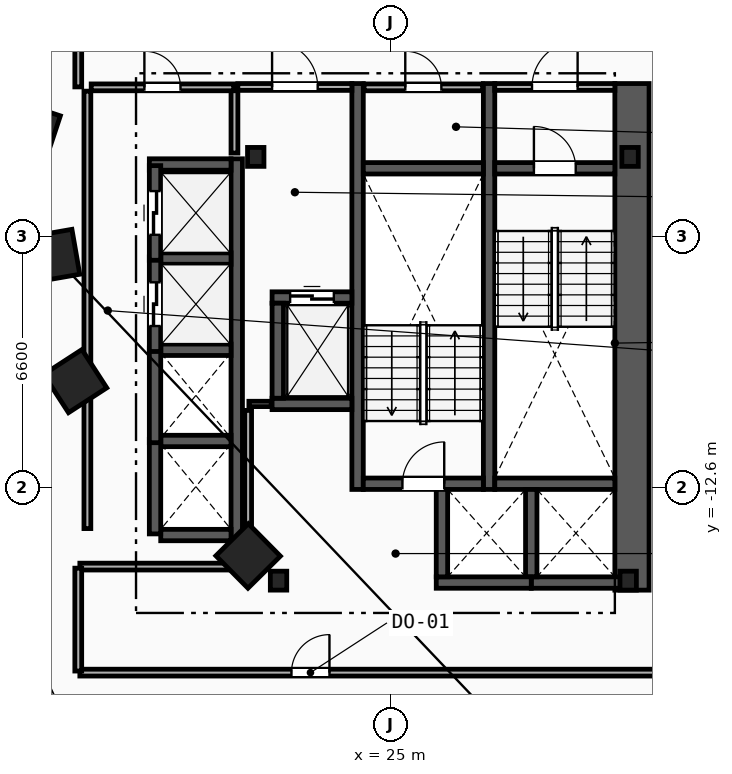
"""IFC4 building model, lengths in metres.
Left out: names, types, materials, properties, quantities, classifications, styles, units other than length and angle.
Written with IfcOpenShell. Run it as: python <this file> out.ifc"""

import sys

from ifc_helpers import new_model, si_unit, direction, frame, frame_2d, origin, origin_2d, place, context, subcontext, project, spatial, rectangle, i_section, extrude, element, fill, save


model = new_model("IFC4")
c1 = context("Model", 3, precision=1e-05, world=origin(), true_north=direction((0.0, 1.0)))
c2 = subcontext(c1, "Body", "Model", "MODEL_VIEW")
j1 = project(units=[si_unit("LENGTHUNIT", "METRE"), si_unit("PLANEANGLEUNIT", "RADIAN")], contexts=[c1])
p1 = place(None, origin())
s1 = spatial("IfcSite", under=j1, at=p1, CompositionType="ELEMENT")
p2 = place(p1, origin())
s2 = spatial("IfcBuilding", under=s1, at=p2, CompositionType="ELEMENT")
p3 = place(p2, frame((0.0, 0.0, 54.4)))
s3 = spatial("IfcBuildingStorey", under=s2, at=p3, CompositionType="ELEMENT", Elevation=54.4)
for number, where, z_axis, x_axis in (
    (1, (31.3, -3.9, 0.0), (0.0, 0.0, 1.0), (1.0, 0.0, 0.0)),
    (2, (21.45, -3.9, 0.0), (0.0, 0.0, 1.0), (1.0, 0.0, 0.0)),
    (3, (22.05, -15.05, 0.0), (0.0, 0.0, 1.0), (1.0, 0.0, 0.0)),
    (4, (31.25, -15.05, 0.0), (0.0, 0.0, 1.0), (1.0, 0.0, 0.0)),
):
    element("IfcColumn", number, at=place(p3, frame(where, z_axis=z_axis, x_axis=x_axis)), inside=s3, PredefinedType="COLUMN", context=c2, shape_type="SweptSolid", body=[
        extrude(i_section(OverallWidth=0.432, OverallDepth=0.498, WebThickness=0.056, FlangeThickness=0.089, FilletRadius=0.018, at=origin_2d()), origin(), (0.0, 0.0, 1.0), 3.8),
    ])
for number, where, z_axis, x_axis in (
    (5, (15.55, -3.2, 0.0), (0.0, 0.0, 1.0), (-0.315, -0.949, 0.0)),
    (6, (16.125, -6.5, 0.0), (0.0, 0.0, 1.0), (0.172, -0.985, 0.0)),
    (7, (16.7, -9.8, 0.0), (0.0, 0.0, 1.0), (0.544, -0.839, 0.0)),
    (8, (21.25, -14.4, 0.0), (0.0, 0.0, 1.0), (0.703, -0.711, 0.0)),
):
    element("IfcColumn", number, at=place(p3, frame(where, z_axis=z_axis, x_axis=x_axis)), inside=s3, PredefinedType="COLUMN", context=c2, shape_type="SweptSolid", body=[
        extrude(rectangle(XDim=1.2, YDim=1.2, at=origin_2d()), origin(), (0.0, 0.0, 1.0), 3.8),
    ])
p4 = place(p3, frame((31.35, -15.3, 0.0), z_axis=(0.0, 0.0, 1.0), x_axis=(0.0, 1.0, 0.0)))
e9 = element("IfcWall", 9, at=p4, inside=s3, PredefinedType="SHEAR", context=c2, shape_type="SweptSolid", body=[
    extrude(rectangle(XDim=13.33, YDim=0.9, at=frame_2d((6.665, 0.0))), origin(), (0.0, 0.0, 1.0), 3.5),
])
for number, where, z_axis, x_axis in (
    (10, (27.59, -12.65, 0.0), (0.0, 0.0, 1.0), (0.0, 1.0, 0.0)),
    (11, (24.13, -12.65, 0.0), (0.0, 0.0, 1.0), (0.0, 1.0, 0.0)),
):
    element("IfcWall", number, at=place(p3, frame(where, z_axis=z_axis, x_axis=x_axis)), inside=s3, PredefinedType="SHEAR", context=c2, shape_type="SweptSolid", body=[
        extrude(rectangle(XDim=10.68, YDim=0.3, at=frame_2d((5.34, 0.0))), origin(), (0.0, 0.0, 1.0), 3.5),
    ])
p5 = place(p3, frame((27.74, -4.2, 0.0), z_axis=(0.0, 0.0, 1.0), x_axis=(1.0, 0.0, 0.0)))
e12 = element("IfcWall", 12, at=p5, inside=s3, PredefinedType="SHEAR", context=c2, shape_type="SweptSolid", body=[
    extrude(rectangle(XDim=3.16, YDim=0.3, at=frame_2d((1.58, 0.0))), origin(), (0.0, 0.0, 1.0), 3.5),
])
p6 = place(p5, frame((1.03, 0.0, 0.0)))
e13 = element("IfcOpeningElement", 13, at=p6, cuts=e12, PredefinedType="OPENING", context=c2, shape_type="SweptSolid", body=[
    extrude(rectangle(XDim=1.1, YDim=2.15, at=frame_2d((0.55, 1.075))), frame((0.0, 0.16, 0.0), z_axis=(0.0, -1.0, 0.0), x_axis=(1.0, 0.0, 0.0)), (0.0, 0.0, 1.0), 0.32),
])
p7 = place(p3, frame((27.74, -12.5, 0.0), z_axis=(0.0, 0.0, 1.0), x_axis=(1.0, 0.0, 0.0)))
e14 = element("IfcWall", 14, at=p7, inside=s3, PredefinedType="SHEAR", context=c2, shape_type="SweptSolid", body=[
    extrude(rectangle(XDim=3.16, YDim=0.3, at=frame_2d((1.58, 0.0))), origin(), (0.0, 0.0, 1.0), 3.5),
])
p8 = place(p3, frame((24.28, -12.5, 0.0), z_axis=(0.0, 0.0, 1.0), x_axis=(1.0, 0.0, 0.0)))
e15 = element("IfcWall", 15, at=p8, inside=s3, PredefinedType="SHEAR", context=c2, shape_type="SweptSolid", body=[
    extrude(rectangle(XDim=3.16, YDim=0.3, at=frame_2d((1.58, 0.0))), origin(), (0.0, 0.0, 1.0), 3.5),
])
p9 = place(p8, frame((1.03, 0.0, 0.0)))
e16 = element("IfcOpeningElement", 16, at=p9, cuts=e15, PredefinedType="OPENING", context=c2, shape_type="SweptSolid", body=[
    extrude(rectangle(XDim=1.1, YDim=2.15, at=frame_2d((0.55, 1.075))), frame((0.0, 0.16, 0.0), z_axis=(0.0, -1.0, 0.0), x_axis=(1.0, 0.0, 0.0)), (0.0, 0.0, 1.0), 0.32),
])
p10 = place(p3, frame((24.28, -4.2, 0.0), z_axis=(0.0, 0.0, 1.0), x_axis=(1.0, 0.0, 0.0)))
e17 = element("IfcWall", 17, at=p10, inside=s3, PredefinedType="SHEAR", context=c2, shape_type="SweptSolid", body=[
    extrude(rectangle(XDim=3.16, YDim=0.3, at=frame_2d((1.58, 0.0))), origin(), (0.0, 0.0, 1.0), 3.5),
])
p11 = place(p3, frame((20.89, -3.8, 0.0), z_axis=(0.0, 0.0, 1.0), x_axis=(0.0, 1.0, 0.0)))
e18 = element("IfcWall", 18, at=p11, inside=s3, PredefinedType="PARTITIONING", context=c2, shape_type="SweptSolid", body=[
    extrude(rectangle(XDim=1.65, YDim=0.18, at=frame_2d((0.825, 0.0))), origin(), (0.0, 0.0, 1.0), 3.5),
])
p12 = place(p3, frame((20.98, -2.06, 0.0), z_axis=(0.0, 0.0, 1.0), x_axis=(1.0, 0.0, 0.0)))
e19 = element("IfcWall", 19, at=p12, inside=s3, PredefinedType="PARTITIONING", context=c2, shape_type="SweptSolid", body=[
    extrude(rectangle(XDim=3.0, YDim=0.18, at=frame_2d((1.5, 0.0))), origin(), (0.0, 0.0, 1.0), 3.5),
])
p13 = place(p12, frame((0.9, 0.0, 0.0)))
e20 = element("IfcOpeningElement", 20, at=p13, cuts=e19, PredefinedType="OPENING", context=c2, shape_type="SweptSolid", body=[
    extrude(rectangle(XDim=1.2, YDim=2.15, at=frame_2d((0.6, 1.075))), frame((0.0, 0.1, 0.0), z_axis=(0.0, -1.0, 0.0), x_axis=(1.0, 0.0, 0.0)), (0.0, 0.0, 1.0), 0.2),
])
p14 = place(p3, frame((27.74, -2.06, 0.0), z_axis=(0.0, 0.0, 1.0), x_axis=(1.0, 0.0, 0.0)))
e21 = element("IfcWall", 21, at=p14, inside=s3, PredefinedType="PARTITIONING", context=c2, shape_type="SweptSolid", body=[
    extrude(rectangle(XDim=3.16, YDim=0.18, at=frame_2d((1.58, 0.0))), origin(), (0.0, 0.0, 1.0), 3.5),
])
p15 = place(p14, frame((0.98, 0.0, 0.0)))
e22 = element("IfcOpeningElement", 22, at=p15, cuts=e21, PredefinedType="OPENING", context=c2, shape_type="SweptSolid", body=[
    extrude(rectangle(XDim=1.2, YDim=2.15, at=frame_2d((0.6, 1.075))), frame((0.0, 0.1, 0.0), z_axis=(0.0, -1.0, 0.0), x_axis=(1.0, 0.0, 0.0)), (0.0, 0.0, 1.0), 0.2),
])
p16 = place(p3, frame((21.88, -7.6, 0.0), z_axis=(0.0, 0.0, 1.0), x_axis=(1.0, 0.0, 0.0)))
e23 = element("IfcWall", 23, at=p16, inside=s3, PredefinedType="SHEAR", context=c2, shape_type="SweptSolid", body=[
    extrude(rectangle(XDim=2.1, YDim=0.3, at=frame_2d((1.05, 0.0))), origin(), (0.0, 0.0, 1.0), 3.5),
])
p17 = place(p16, frame((0.475, 0.0, 0.0)))
e24 = element("IfcOpeningElement", 24, at=p17, cuts=e23, PredefinedType="OPENING", context=c2, shape_type="SweptSolid", body=[
    extrude(rectangle(XDim=1.15, YDim=2.2, at=frame_2d((0.575, 1.1))), frame((0.0, 0.16, 0.0), z_axis=(0.0, -1.0, 0.0), x_axis=(1.0, 0.0, 0.0)), (0.0, 0.0, 1.0), 0.32),
])
p18 = place(p3, frame((21.88, -10.4, 0.0), z_axis=(0.0, 0.0, 1.0), x_axis=(1.0, 0.0, 0.0)))
e25 = element("IfcWall", 25, at=p18, inside=s3, PredefinedType="SHEAR", context=c2, shape_type="SweptSolid", body=[
    extrude(rectangle(XDim=2.1, YDim=0.3, at=frame_2d((1.05, 0.0))), origin(), (0.0, 0.0, 1.0), 3.5),
])
for number, where, z_axis, x_axis in (
    (26, (22.03, -10.25, 0.0), (0.0, 0.0, 1.0), (0.0, 1.0, 0.0)),
    (27, (28.7, -15.1, 0.0), (0.0, 0.0, 1.0), (1.0, 0.0, 0.0)),
):
    element("IfcWall", number, at=place(p3, frame(where, z_axis=z_axis, x_axis=x_axis)), inside=s3, PredefinedType="SHEAR", context=c2, shape_type="SweptSolid", body=[
        extrude(rectangle(XDim=2.5, YDim=0.3, at=frame_2d((1.25, 0.0))), origin(), (0.0, 0.0, 1.0), 3.5),
    ])
p19 = place(p3, frame((28.7, -14.95, 0.0), z_axis=(0.0, 0.0, 1.0), x_axis=(0.0, 1.0, 0.0)))
e28 = element("IfcWall", 28, at=p19, inside=s3, PredefinedType="SHEAR", context=c2, shape_type="SweptSolid", body=[
    extrude(rectangle(XDim=2.3, YDim=0.3, at=frame_2d((1.15, 0.0))), origin(), (0.0, 0.0, 1.0), 3.5),
])
p20 = place(p3, frame((26.2, -15.1, 0.0), z_axis=(0.0, 0.0, 1.0), x_axis=(1.0, 0.0, 0.0)))
e29 = element("IfcWall", 29, at=p20, inside=s3, PredefinedType="SHEAR", context=c2, shape_type="SweptSolid", body=[
    extrude(rectangle(XDim=2.5, YDim=0.3, at=frame_2d((1.25, 0.0))), origin(), (0.0, 0.0, 1.0), 3.5),
])
p21 = place(p3, frame((26.35, -14.95, 0.0), z_axis=(0.0, 0.0, 1.0), x_axis=(0.0, 1.0, 0.0)))
e30 = element("IfcWall", 30, at=p21, inside=s3, PredefinedType="SHEAR", context=c2, shape_type="SweptSolid", body=[
    extrude(rectangle(XDim=2.3, YDim=0.3, at=frame_2d((1.15, 0.0))), origin(), (0.0, 0.0, 1.0), 3.5),
])
p22 = place(p3, frame((20.95, -14.0, 0.0), z_axis=(0.0, 0.0, 1.0), x_axis=(0.0, 1.0, 0.0)))
e31 = element("IfcWall", 31, at=p22, inside=s3, PredefinedType="SHEAR", context=c2, shape_type="SweptSolid", body=[
    extrude(rectangle(XDim=10.05, YDim=0.3, at=frame_2d((5.025, 0.0))), origin(), (0.0, 0.0, 1.0), 3.5),
])
p23 = place(p3, frame((18.95, -13.85, 0.0), z_axis=(0.0, 0.0, 1.0), x_axis=(1.0, 0.0, 0.0)))
e32 = element("IfcWall", 32, at=p23, inside=s3, PredefinedType="SHEAR", context=c2, shape_type="SweptSolid", body=[
    extrude(rectangle(XDim=1.85, YDim=0.3, at=frame_2d((0.925, 0.0))), origin(), (0.0, 0.0, 1.0), 3.5),
])
p24 = place(p3, frame((18.65, -4.1, 0.0), z_axis=(0.0, 0.0, 1.0), x_axis=(1.0, 0.0, 0.0)))
e33 = element("IfcWall", 33, at=p24, inside=s3, PredefinedType="SHEAR", context=c2, shape_type="SweptSolid", body=[
    extrude(rectangle(XDim=2.15, YDim=0.3, at=frame_2d((1.075, 0.0))), origin(), (0.0, 0.0, 1.0), 3.5),
])
for number, where, z_axis, x_axis in (
    (34, (18.95, -11.375, 0.0), (0.0, 0.0, 1.0), (1.0, 0.0, 0.0)),
    (35, (18.95, -8.975, 0.0), (0.0, 0.0, 1.0), (1.0, 0.0, 0.0)),
    (36, (18.95, -6.575, 0.0), (0.0, 0.0, 1.0), (1.0, 0.0, 0.0)),
):
    element("IfcWall", number, at=place(p3, frame(where, z_axis=z_axis, x_axis=x_axis)), inside=s3, PredefinedType="SHEAR", context=c2, shape_type="SweptSolid", body=[
        extrude(rectangle(XDim=1.85, YDim=0.3, at=frame_2d((0.925, 0.0))), origin(), (0.0, 0.0, 1.0), 3.5),
    ])
for number, where, z_axis, x_axis in (
    (37, (18.8, -13.82, 0.0), (0.0, 0.0, 1.0), (0.0, 1.0, 0.0)),
    (38, (18.8, -11.42, 0.0), (0.0, 0.0, 1.0), (0.0, 1.0, 0.0)),
):
    element("IfcWall", number, at=place(p3, frame(where, z_axis=z_axis, x_axis=x_axis)), inside=s3, PredefinedType="SHEAR", context=c2, shape_type="SweptSolid", body=[
        extrude(rectangle(XDim=2.49, YDim=0.3, at=frame_2d((1.245, 0.0))), origin(), (0.0, 0.0, 1.0), 3.5),
    ])
p25 = place(p3, frame((18.8, -9.02, 0.0), z_axis=(0.0, 0.0, 1.0), x_axis=(0.0, 1.0, 0.0)))
e39 = element("IfcWall", 39, at=p25, inside=s3, PredefinedType="SHEAR", context=c2, shape_type="SweptSolid", body=[
    extrude(rectangle(XDim=2.49, YDim=0.3, at=frame_2d((1.245, 0.0))), origin(), (0.0, 0.0, 1.0), 3.5),
])
p26 = place(p25, frame((0.67, 0.0, 0.0)))
e40 = element("IfcOpeningElement", 40, at=p26, cuts=e39, PredefinedType="OPENING", context=c2, shape_type="SweptSolid", body=[
    extrude(rectangle(XDim=1.15, YDim=2.2, at=frame_2d((0.575, 1.1))), frame((0.0, 0.16, 0.0), z_axis=(0.0, -1.0, 0.0), x_axis=(1.0, 0.0, 0.0)), (0.0, 0.0, 1.0), 0.32),
])
p27 = place(p3, frame((18.8, -6.62, 0.0), z_axis=(0.0, 0.0, 1.0), x_axis=(0.0, 1.0, 0.0)))
e41 = element("IfcWall", 41, at=p27, inside=s3, PredefinedType="SHEAR", context=c2, shape_type="SweptSolid", body=[
    extrude(rectangle(XDim=2.49, YDim=0.3, at=frame_2d((1.245, 0.0))), origin(), (0.0, 0.0, 1.0), 3.5),
])
p28 = place(p27, frame((0.67, 0.0, 0.0)))
e42 = element("IfcOpeningElement", 42, at=p28, cuts=e41, PredefinedType="OPENING", context=c2, shape_type="SweptSolid", body=[
    extrude(rectangle(XDim=1.15, YDim=2.2, at=frame_2d((0.575, 1.1))), frame((0.0, 0.16, 0.0), z_axis=(0.0, -1.0, 0.0), x_axis=(1.0, 0.0, 0.0)), (0.0, 0.0, 1.0), 0.32),
])
p29 = place(p3, frame((17.02, -13.68, 0.0), z_axis=(0.0, 0.0, 1.0), x_axis=(0.0, 1.0, 0.0)))
e43 = element("IfcWall", 43, at=p29, inside=s3, PredefinedType="PARTITIONING", context=c2, shape_type="SweptSolid", body=[
    extrude(rectangle(XDim=11.51, YDim=0.18, at=frame_2d((5.755, 0.0))), origin(), (0.0, 0.0, 1.0), 3.5),
])
p30 = place(p3, frame((17.12, -2.07, 0.0), z_axis=(0.0, 0.0, 1.0), x_axis=(1.0, 0.0, 0.0)))
e44 = element("IfcWall", 44, at=p30, inside=s3, PredefinedType="PARTITIONING", context=c2, shape_type="SweptSolid", body=[
    extrude(rectangle(XDim=3.75, YDim=0.18, at=frame_2d((1.875, 0.0))), origin(), (0.0, 0.0, 1.0), 3.5),
])
p31 = place(p30, frame((1.4, 0.0, 0.0)))
e45 = element("IfcOpeningElement", 45, at=p31, cuts=e44, PredefinedType="OPENING", context=c2, shape_type="SweptSolid", body=[
    extrude(rectangle(XDim=0.95, YDim=2.1, at=frame_2d((0.475, 1.05))), frame((0.0, 0.1, 0.0), z_axis=(0.0, -1.0, 0.0), x_axis=(1.0, 0.0, 0.0)), (0.0, 0.0, 1.0), 0.2),
])
p32 = place(p3, frame((21.27, -10.4, 0.0), z_axis=(0.0, 0.0, 1.0), x_axis=(1.0, 0.0, 0.0)))
e46 = element("IfcWall", 46, at=p32, inside=s3, PredefinedType="PARTITIONING", context=c2, shape_type="SweptSolid", body=[
    extrude(rectangle(XDim=0.59, YDim=0.14, at=frame_2d((0.295, 0.0))), origin(), (0.0, 0.0, 1.0), 3.5),
])
p33 = place(p3, frame((21.25, -14.93, 0.0), z_axis=(0.0, 0.0, 1.0), x_axis=(0.0, 1.0, 0.0)))
e47 = element("IfcWall", 47, at=p33, inside=s3, PredefinedType="PARTITIONING", context=c2, shape_type="SweptSolid", body=[
    extrude(rectangle(XDim=4.36, YDim=0.18, at=frame_2d((2.18, 0.0))), origin(), (0.0, 0.0, 1.0), 3.5),
])
p34 = place(p3, frame((24.3, -2.07, 0.0), z_axis=(0.0, 0.0, 1.0), x_axis=(1.0, 0.0, 0.0)))
e48 = element("IfcWall", 48, at=p34, inside=s3, PredefinedType="PARTITIONING", context=c2, shape_type="SweptSolid", body=[
    extrude(rectangle(XDim=3.12, YDim=0.18, at=frame_2d((1.56, 0.0))), origin(), (0.0, 0.0, 1.0), 3.5),
])
p35 = place(p34, frame((1.085, 0.0, 0.0)))
e49 = element("IfcOpeningElement", 49, at=p35, cuts=e48, PredefinedType="OPENING", context=c2, shape_type="SweptSolid", body=[
    extrude(rectangle(XDim=0.95, YDim=2.1, at=frame_2d((0.475, 1.05))), frame((0.0, 0.1, 0.0), z_axis=(0.0, -1.0, 0.0), x_axis=(1.0, 0.0, 0.0)), (0.0, 0.0, 1.0), 0.2),
])
p36 = place(p3, frame((16.822, -17.47, 0.0), z_axis=(0.0, 0.0, 1.0), x_axis=(1.0, 0.0, 0.0)))
e50 = element("IfcWall", 50, at=p36, inside=s3, PredefinedType="PARTITIONING", context=c2, shape_type="SweptSolid", body=[
    extrude(rectangle(XDim=16.807, YDim=0.18, at=frame_2d((8.403, 0.0))), origin(), (0.0, 0.0, 1.0), 3.5),
])
p37 = place(p36, frame((5.569, 0.0, 0.0)))
e51 = element("IfcOpeningElement", 51, at=p37, cuts=e50, PredefinedType="OPENING", context=c2, shape_type="SweptSolid", body=[
    extrude(rectangle(XDim=1.0, YDim=2.15, at=frame_2d((0.5, 1.075))), frame((0.0, 0.1, 0.0), z_axis=(0.0, -1.0, 0.0), x_axis=(1.0, 0.0, 0.0)), (0.0, 0.0, 1.0), 0.2),
])
p38 = place(p3, frame((21.178, -14.68, 0.0), z_axis=(0.0, 0.0, 1.0), x_axis=(-1.0, 0.0, 0.0)))
e52 = element("IfcWall", 52, at=p38, inside=s3, PredefinedType="PARTITIONING", context=c2, shape_type="SweptSolid", body=[
    extrude(rectangle(XDim=4.357, YDim=0.18, at=frame_2d((2.178, 0.0))), origin(), (0.0, 0.0, 1.0), 3.5),
])
p39 = place(p3, frame((16.78, -14.721, 0.0), z_axis=(0.0, 0.0, 1.0), x_axis=(0.0, -1.0, 0.0)))
e53 = element("IfcWall", 53, at=p39, inside=s3, PredefinedType="PARTITIONING", context=c2, shape_type="SweptSolid", body=[
    extrude(rectangle(XDim=2.707, YDim=0.18, at=frame_2d((1.354, 0.0))), origin(), (0.0, 0.0, 1.0), 3.5),
])
p40 = place(p3, frame((16.78, 0.329, 0.0), z_axis=(0.0, 0.0, 1.0), x_axis=(0.0, -1.0, 0.0)))
e54 = element("IfcWall", 54, at=p40, inside=s3, PredefinedType="PARTITIONING", context=c2, shape_type="SweptSolid", body=[
    extrude(rectangle(XDim=2.387, YDim=0.18, at=frame_2d((1.194, 0.0))), origin(), (0.0, 0.0, 1.0), 3.5),
])
p41 = place(p6, origin())
e55 = element("IfcDoor", 55, at=p41, inside=s3, OperationType="SINGLE_SWING_LEFT", PredefinedType="DOOR", context=c2, shape_type="SweptSolid", body=[
    extrude(rectangle(XDim=1.1, YDim=2.15, at=frame_2d((0.55, 1.075))), frame((0.0, 0.025, 0.0), z_axis=(0.0, -1.0, 0.0), x_axis=(1.0, 0.0, 0.0)), (0.0, 0.0, 1.0), 0.05),
])
fill(e13, e55)
p42 = place(p9, origin())
e56 = element("IfcDoor", 56, at=p42, inside=s3, OperationType="SINGLE_SWING_RIGHT", PredefinedType="DOOR", context=c2, shape_type="SweptSolid", body=[
    extrude(rectangle(XDim=1.1, YDim=2.15, at=frame_2d((0.55, 1.075))), frame((0.0, 0.025, 0.0), z_axis=(0.0, -1.0, 0.0), x_axis=(1.0, 0.0, 0.0)), (0.0, 0.0, 1.0), 0.05),
])
fill(e16, e56)
p43 = place(p13, origin())
e57 = element("IfcDoor", 57, at=p43, inside=s3, OperationType="SINGLE_SWING_LEFT", PredefinedType="DOOR", context=c2, shape_type="SweptSolid", body=[
    extrude(rectangle(XDim=1.2, YDim=2.15, at=frame_2d((0.6, 1.075))), frame((0.0, 0.025, 0.0), z_axis=(0.0, -1.0, 0.0), x_axis=(1.0, 0.0, 0.0)), (0.0, 0.0, 1.0), 0.05),
])
fill(e20, e57)
p44 = place(p15, origin())
e58 = element("IfcDoor", 58, at=p44, inside=s3, OperationType="SINGLE_SWING_RIGHT", PredefinedType="DOOR", context=c2, shape_type="SweptSolid", body=[
    extrude(rectangle(XDim=1.2, YDim=2.15, at=frame_2d((0.6, 1.075))), frame((0.0, 0.025, 0.0), z_axis=(0.0, -1.0, 0.0), x_axis=(1.0, 0.0, 0.0)), (0.0, 0.0, 1.0), 0.05),
])
fill(e22, e58)
p45 = place(p17, origin())
e59 = element("IfcDoor", 59, at=p45, inside=s3, OperationType="SLIDING_TO_LEFT", PredefinedType="TRAPDOOR", context=c2, shape_type="SweptSolid", body=[
    extrude(rectangle(XDim=1.15, YDim=2.2, at=frame_2d((0.575, 1.1))), frame((0.0, 0.025, 0.0), z_axis=(0.0, -1.0, 0.0), x_axis=(1.0, 0.0, 0.0)), (0.0, 0.0, 1.0), 0.05),
])
fill(e24, e59)
p46 = place(p26, origin())
e60 = element("IfcDoor", 60, at=p46, inside=s3, OperationType="SLIDING_TO_LEFT", PredefinedType="TRAPDOOR", context=c2, shape_type="SweptSolid", body=[
    extrude(rectangle(XDim=1.15, YDim=2.2, at=frame_2d((0.575, 1.1))), frame((0.0, 0.025, 0.0), z_axis=(0.0, -1.0, 0.0), x_axis=(1.0, 0.0, 0.0)), (0.0, 0.0, 1.0), 0.05),
])
fill(e40, e60)
p47 = place(p28, origin())
e61 = element("IfcDoor", 61, at=p47, inside=s3, OperationType="SLIDING_TO_LEFT", PredefinedType="TRAPDOOR", context=c2, shape_type="SweptSolid", body=[
    extrude(rectangle(XDim=1.15, YDim=2.2, at=frame_2d((0.575, 1.1))), frame((0.0, 0.025, 0.0), z_axis=(0.0, -1.0, 0.0), x_axis=(1.0, 0.0, 0.0)), (0.0, 0.0, 1.0), 0.05),
])
fill(e42, e61)
p48 = place(p37, origin())
e62 = element("IfcDoor", 62, at=p48, inside=s3, OperationType="SINGLE_SWING_RIGHT", PredefinedType="DOOR", context=c2, shape_type="SweptSolid", body=[
    extrude(rectangle(XDim=1.0, YDim=2.15, at=frame_2d((0.5, 1.075))), frame((0.0, 0.025, 0.0), z_axis=(0.0, -1.0, 0.0), x_axis=(1.0, 0.0, 0.0)), (0.0, 0.0, 1.0), 0.05),
])
fill(e51, e62)
p49 = place(p31, origin())
e63 = element("IfcDoor", 63, at=p49, inside=s3, OperationType="SINGLE_SWING_LEFT", PredefinedType="DOOR", context=c2, shape_type="SweptSolid", body=[
    extrude(rectangle(XDim=0.95, YDim=2.1, at=frame_2d((0.475, 1.05))), frame((0.0, 0.025, 0.0), z_axis=(0.0, -1.0, 0.0), x_axis=(1.0, 0.0, 0.0)), (0.0, 0.0, 1.0), 0.05),
])
fill(e45, e63)
p50 = place(p35, origin())
e64 = element("IfcDoor", 64, at=p50, inside=s3, OperationType="SINGLE_SWING_LEFT", PredefinedType="DOOR", context=c2, shape_type="SweptSolid", body=[
    extrude(rectangle(XDim=0.95, YDim=2.1, at=frame_2d((0.475, 1.05))), frame((0.0, 0.025, 0.0), z_axis=(0.0, -1.0, 0.0), x_axis=(1.0, 0.0, 0.0)), (0.0, 0.0, 1.0), 0.05),
])
fill(e49, e64)
save(model, sys.argv[1])
